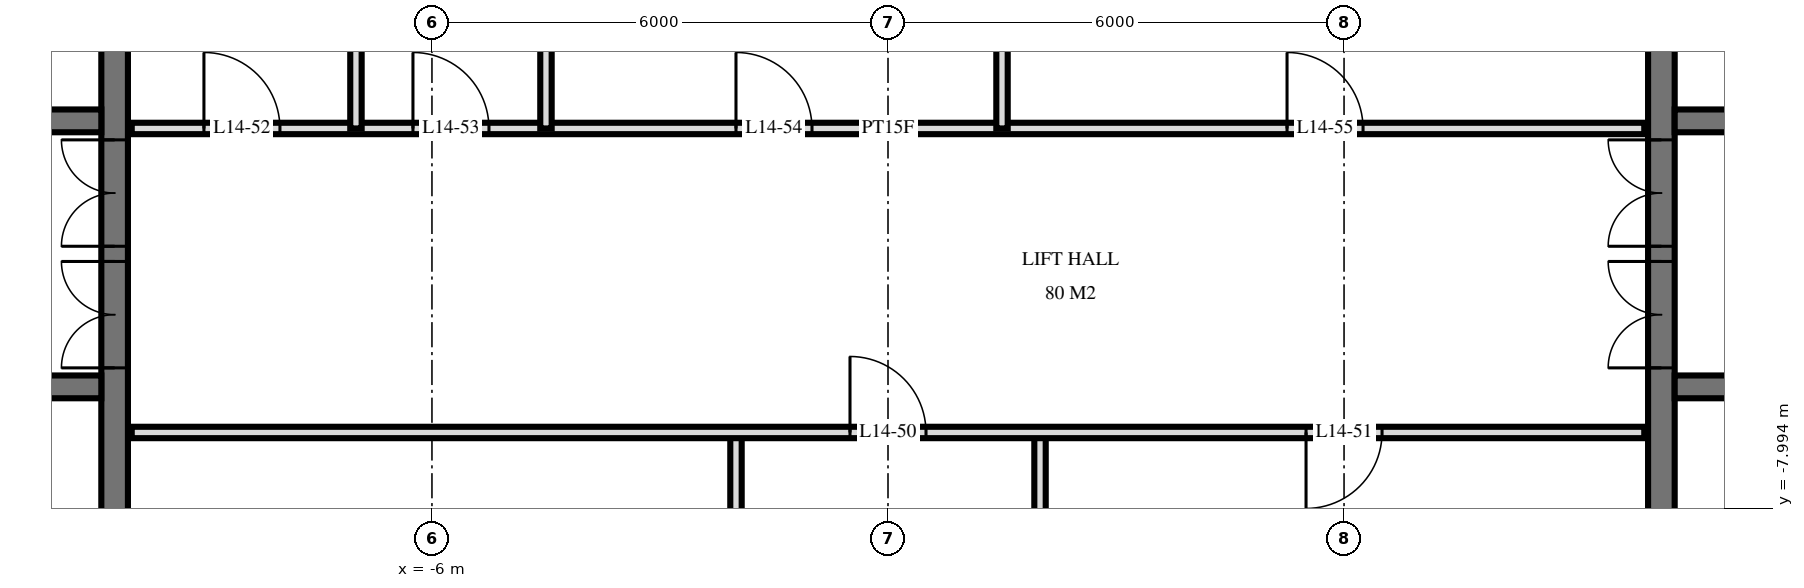
"""IFC4 building model, lengths in metres.
Left out: names, types, materials, properties, quantities, classifications, styles, units other than length and angle.
Written with IfcOpenShell. Run it as: python <this file> out.ifc"""

import sys

from ifc_helpers import new_model, si_unit, direction, frame, frame_2d, origin, place, context, subcontext, project, spatial, rectangle, extrude, element, fill, save


model = new_model("IFC4")
c1 = context("Model", 3, precision=1e-05, world=origin(), true_north=direction((0.0, 1.0)))
c2 = subcontext(c1, "Body", "Model", "MODEL_VIEW")
j1 = project(units=[si_unit("LENGTHUNIT", "METRE"), si_unit("PLANEANGLEUNIT", "RADIAN")], contexts=[c1])
p1 = place(None, origin())
s1 = spatial("IfcSite", under=j1, at=p1, CompositionType="ELEMENT")
p2 = place(p1, origin())
s2 = spatial("IfcBuilding", under=s1, at=p2, CompositionType="ELEMENT")
p3 = place(p2, frame((0.0, 0.0, 60.0)))
s3 = spatial("IfcBuildingStorey", under=s2, at=p3, CompositionType="ELEMENT", Elevation=60.0)
p4 = place(p3, frame((-10.175, -14.55, 0.0), z_axis=(0.0, 0.0, 1.0), x_axis=(0.0, 1.0, 0.0)))
e1 = element("IfcWall", 1, at=p4, inside=s3, PredefinedType="SHEAR", context=c2, shape_type="SweptSolid", body=[
    extrude(rectangle(XDim=14.1, YDim=0.35, at=frame_2d((7.05, 0.0))), origin(), (0.0, 0.0, 1.0), 3.6),
])
p5 = place(p4, frame((8.4, 0.0, 0.0)))
e2 = element("IfcOpeningElement", 2, at=p5, cuts=e1, PredefinedType="OPENING", context=c2, shape_type="SweptSolid", body=[
    extrude(rectangle(XDim=1.4, YDim=2.4, at=frame_2d((0.7, 1.2))), frame((0.0, 0.185, 0.0), z_axis=(0.0, -1.0, 0.0), x_axis=(1.0, 0.0, 0.0)), (0.0, 0.0, 1.0), 0.37),
])
p6 = place(p4, frame((10.0, 0.0, 0.0)))
e3 = element("IfcOpeningElement", 3, at=p6, cuts=e1, PredefinedType="OPENING", context=c2, shape_type="SweptSolid", body=[
    extrude(rectangle(XDim=1.4, YDim=2.4, at=frame_2d((0.7, 1.2))), frame((0.0, 0.185, 0.0), z_axis=(0.0, -1.0, 0.0), x_axis=(1.0, 0.0, 0.0)), (0.0, 0.0, 1.0), 0.37),
])
p7 = place(p4, frame((4.0, 0.0, 0.0)))
e4 = element("IfcOpeningElement", 4, at=p7, cuts=e1, PredefinedType="OPENING", context=c2, shape_type="SweptSolid", body=[
    extrude(rectangle(XDim=1.2, YDim=2.1, at=frame_2d((0.6, 1.05))), frame((0.0, 0.185, 0.0), z_axis=(0.0, -1.0, 0.0), x_axis=(1.0, 0.0, 0.0)), (0.0, 0.0, 1.0), 0.37),
])
p8 = place(p3, frame((-29.05, -2.9, 0.0), z_axis=(0.0, 0.0, 1.0), x_axis=(1.0, 0.0, 0.0)))
e5 = element("IfcWall", 5, at=p8, inside=s3, PredefinedType="SHEAR", context=c2, shape_type="SweptSolid", body=[
    extrude(rectangle(XDim=18.7, YDim=0.3, at=frame_2d((9.35, 0.0))), origin(), (0.0, 0.0, 1.0), 3.6),
])
p9 = place(p8, frame((2.95, 0.0, 0.0)))
e6 = element("IfcOpeningElement", 6, at=p9, cuts=e5, PredefinedType="OPENING", context=c2, shape_type="SweptSolid", body=[
    extrude(rectangle(XDim=1.1, YDim=2.1, at=frame_2d((0.55, 1.05))), frame((0.0, 0.16, 0.0), z_axis=(0.0, -1.0, 0.0), x_axis=(1.0, 0.0, 0.0)), (0.0, 0.0, 1.0), 0.32),
])
p10 = place(p8, frame((0.55, 0.0, 0.0)))
e7 = element("IfcOpeningElement", 7, at=p10, cuts=e5, PredefinedType="OPENING", context=c2, shape_type="SweptSolid", body=[
    extrude(rectangle(XDim=1.1, YDim=2.1, at=frame_2d((0.55, 1.05))), frame((0.0, 0.16, 0.0), z_axis=(0.0, -1.0, 0.0), x_axis=(1.0, 0.0, 0.0)), (0.0, 0.0, 1.0), 0.32),
])
p11 = place(p8, frame((10.9, 0.0, 0.0)))
e8 = element("IfcOpeningElement", 8, at=p11, cuts=e5, PredefinedType="OPENING", context=c2, shape_type="SweptSolid", body=[
    extrude(rectangle(XDim=0.9, YDim=2.1, at=frame_2d((0.45, 1.05))), frame((0.0, 0.16, 0.0), z_axis=(0.0, -1.0, 0.0), x_axis=(1.0, 0.0, 0.0)), (0.0, 0.0, 1.0), 0.32),
])
p12 = place(p8, frame((16.85, 0.0, 0.0)))
e9 = element("IfcOpeningElement", 9, at=p12, cuts=e5, PredefinedType="OPENING", context=c2, shape_type="SweptSolid", body=[
    extrude(rectangle(XDim=1.0, YDim=2.1, at=frame_2d((0.5, 1.05))), frame((0.0, 0.16, 0.0), z_axis=(0.0, -1.0, 0.0), x_axis=(1.0, 0.0, 0.0)), (0.0, 0.0, 1.0), 0.32),
])
p13 = place(p8, frame((13.85, 0.0, 0.0)))
e10 = element("IfcOpeningElement", 10, at=p13, cuts=e5, PredefinedType="OPENING", context=c2, shape_type="SweptSolid", body=[
    extrude(rectangle(XDim=1.0, YDim=2.1, at=frame_2d((0.5, 1.05))), frame((0.0, 0.16, 0.0), z_axis=(0.0, -1.0, 0.0), x_axis=(1.0, 0.0, 0.0)), (0.0, 0.0, 1.0), 0.32),
])
p14 = place(p8, frame((5.6, 0.0, 0.0)))
e11 = element("IfcOpeningElement", 11, at=p14, cuts=e5, PredefinedType="OPENING", context=c2, shape_type="SweptSolid", body=[
    extrude(rectangle(XDim=1.0, YDim=2.1, at=frame_2d((0.5, 1.05))), frame((0.0, 0.16, 0.0), z_axis=(0.0, -1.0, 0.0), x_axis=(1.0, 0.0, 0.0)), (0.0, 0.0, 1.0), 0.32),
])
p15 = place(p3, frame((-29.05, -6.4, 0.0), z_axis=(0.0, 0.0, 1.0), x_axis=(1.0, 0.0, 0.0)))
e12 = element("IfcWall", 12, at=p15, inside=s3, PredefinedType="SHEAR", context=c2, shape_type="SweptSolid", body=[
    extrude(rectangle(XDim=18.7, YDim=0.3, at=frame_2d((9.35, 0.0))), origin(), (0.0, 0.0, 1.0), 3.6),
])
p16 = place(p15, frame((2.95, 0.0, 0.0)))
e13 = element("IfcOpeningElement", 13, at=p16, cuts=e12, PredefinedType="OPENING", context=c2, shape_type="SweptSolid", body=[
    extrude(rectangle(XDim=1.1, YDim=2.1, at=frame_2d((0.55, 1.05))), frame((0.0, 0.16, 0.0), z_axis=(0.0, -1.0, 0.0), x_axis=(1.0, 0.0, 0.0)), (0.0, 0.0, 1.0), 0.32),
])
p17 = place(p15, frame((0.55, 0.0, 0.0)))
e14 = element("IfcOpeningElement", 14, at=p17, cuts=e12, PredefinedType="OPENING", context=c2, shape_type="SweptSolid", body=[
    extrude(rectangle(XDim=1.1, YDim=2.1, at=frame_2d((0.55, 1.05))), frame((0.0, 0.16, 0.0), z_axis=(0.0, -1.0, 0.0), x_axis=(1.0, 0.0, 0.0)), (0.0, 0.0, 1.0), 0.32),
])
p18 = place(p15, frame((10.8, 0.0, 0.0)))
e15 = element("IfcOpeningElement", 15, at=p18, cuts=e12, PredefinedType="OPENING", context=c2, shape_type="SweptSolid", body=[
    extrude(rectangle(XDim=1.1, YDim=2.1, at=frame_2d((0.55, 1.05))), frame((0.0, 0.16, 0.0), z_axis=(0.0, -1.0, 0.0), x_axis=(1.0, 0.0, 0.0)), (0.0, 0.0, 1.0), 0.32),
])
p19 = place(p15, frame((5.6, 0.0, 0.0)))
e16 = element("IfcOpeningElement", 16, at=p19, cuts=e12, PredefinedType="OPENING", context=c2, shape_type="SweptSolid", body=[
    extrude(rectangle(XDim=1.0, YDim=2.1, at=frame_2d((0.5, 1.05))), frame((0.0, 0.16, 0.0), z_axis=(0.0, -1.0, 0.0), x_axis=(1.0, 0.0, 0.0)), (0.0, 0.0, 1.0), 0.32),
])
p20 = place(p3, frame((10.175, -14.55, 0.0), z_axis=(0.0, 0.0, 1.0), x_axis=(0.0, 1.0, 0.0)))
e17 = element("IfcWall", 17, at=p20, inside=s3, PredefinedType="SHEAR", context=c2, shape_type="SweptSolid", body=[
    extrude(rectangle(XDim=14.1, YDim=0.35, at=frame_2d((7.05, 0.0))), origin(), (0.0, 0.0, 1.0), 3.6),
])
p21 = place(p20, frame((8.4, 0.0, 0.0)))
e18 = element("IfcOpeningElement", 18, at=p21, cuts=e17, PredefinedType="OPENING", context=c2, shape_type="SweptSolid", body=[
    extrude(rectangle(XDim=1.4, YDim=2.4, at=frame_2d((0.7, 1.2))), frame((0.0, 0.185, 0.0), z_axis=(0.0, -1.0, 0.0), x_axis=(1.0, 0.0, 0.0)), (0.0, 0.0, 1.0), 0.37),
])
p22 = place(p20, frame((10.0, 0.0, 0.0)))
e19 = element("IfcOpeningElement", 19, at=p22, cuts=e17, PredefinedType="OPENING", context=c2, shape_type="SweptSolid", body=[
    extrude(rectangle(XDim=1.4, YDim=2.4, at=frame_2d((0.7, 1.2))), frame((0.0, 0.185, 0.0), z_axis=(0.0, -1.0, 0.0), x_axis=(1.0, 0.0, 0.0)), (0.0, 0.0, 1.0), 0.37),
])
p23 = place(p20, frame((4.0, 0.0, 0.0)))
e20 = element("IfcOpeningElement", 20, at=p23, cuts=e17, PredefinedType="OPENING", context=c2, shape_type="SweptSolid", body=[
    extrude(rectangle(XDim=1.2, YDim=2.1, at=frame_2d((0.6, 1.05))), frame((0.0, 0.185, 0.0), z_axis=(0.0, -1.0, 0.0), x_axis=(1.0, 0.0, 0.0)), (0.0, 0.0, 1.0), 0.37),
])
p24 = place(p3, frame((10.35, -2.9, 0.0), z_axis=(0.0, 0.0, 1.0), x_axis=(1.0, 0.0, 0.0)))
e21 = element("IfcWall", 21, at=p24, inside=s3, PredefinedType="SHEAR", context=c2, shape_type="SweptSolid", body=[
    extrude(rectangle(XDim=18.7, YDim=0.3, at=frame_2d((9.35, 0.0))), origin(), (0.0, 0.0, 1.0), 3.6),
])
p25 = place(p24, frame((14.65, 0.0, 0.0)))
e22 = element("IfcOpeningElement", 22, at=p25, cuts=e21, PredefinedType="OPENING", context=c2, shape_type="SweptSolid", body=[
    extrude(rectangle(XDim=1.1, YDim=2.1, at=frame_2d((0.55, 1.05))), frame((0.0, 0.16, 0.0), z_axis=(0.0, -1.0, 0.0), x_axis=(1.0, 0.0, 0.0)), (0.0, 0.0, 1.0), 0.32),
])
p26 = place(p24, frame((17.05, 0.0, 0.0)))
e23 = element("IfcOpeningElement", 23, at=p26, cuts=e21, PredefinedType="OPENING", context=c2, shape_type="SweptSolid", body=[
    extrude(rectangle(XDim=1.1, YDim=2.1, at=frame_2d((0.55, 1.05))), frame((0.0, 0.16, 0.0), z_axis=(0.0, -1.0, 0.0), x_axis=(1.0, 0.0, 0.0)), (0.0, 0.0, 1.0), 0.32),
])
p27 = place(p24, frame((6.9, 0.0, 0.0)))
e24 = element("IfcOpeningElement", 24, at=p27, cuts=e21, PredefinedType="OPENING", context=c2, shape_type="SweptSolid", body=[
    extrude(rectangle(XDim=0.9, YDim=2.1, at=frame_2d((0.45, 1.05))), frame((0.0, 0.16, 0.0), z_axis=(0.0, -1.0, 0.0), x_axis=(1.0, 0.0, 0.0)), (0.0, 0.0, 1.0), 0.32),
])
p28 = place(p24, frame((0.85, 0.0, 0.0)))
e25 = element("IfcOpeningElement", 25, at=p28, cuts=e21, PredefinedType="OPENING", context=c2, shape_type="SweptSolid", body=[
    extrude(rectangle(XDim=1.0, YDim=2.1, at=frame_2d((0.5, 1.05))), frame((0.0, 0.16, 0.0), z_axis=(0.0, -1.0, 0.0), x_axis=(1.0, 0.0, 0.0)), (0.0, 0.0, 1.0), 0.32),
])
p29 = place(p24, frame((3.85, 0.0, 0.0)))
e26 = element("IfcOpeningElement", 26, at=p29, cuts=e21, PredefinedType="OPENING", context=c2, shape_type="SweptSolid", body=[
    extrude(rectangle(XDim=1.0, YDim=2.1, at=frame_2d((0.5, 1.05))), frame((0.0, 0.16, 0.0), z_axis=(0.0, -1.0, 0.0), x_axis=(1.0, 0.0, 0.0)), (0.0, 0.0, 1.0), 0.32),
])
p30 = place(p24, frame((12.1, 0.0, 0.0)))
e27 = element("IfcOpeningElement", 27, at=p30, cuts=e21, PredefinedType="OPENING", context=c2, shape_type="SweptSolid", body=[
    extrude(rectangle(XDim=1.0, YDim=2.1, at=frame_2d((0.5, 1.05))), frame((0.0, 0.16, 0.0), z_axis=(0.0, -1.0, 0.0), x_axis=(1.0, 0.0, 0.0)), (0.0, 0.0, 1.0), 0.32),
])
p31 = place(p3, frame((10.35, -6.4, 0.0), z_axis=(0.0, 0.0, 1.0), x_axis=(1.0, 0.0, 0.0)))
e28 = element("IfcWall", 28, at=p31, inside=s3, PredefinedType="SHEAR", context=c2, shape_type="SweptSolid", body=[
    extrude(rectangle(XDim=18.7, YDim=0.3, at=frame_2d((9.35, 0.0))), origin(), (0.0, 0.0, 1.0), 3.6),
])
p32 = place(p31, frame((14.65, 0.0, 0.0)))
e29 = element("IfcOpeningElement", 29, at=p32, cuts=e28, PredefinedType="OPENING", context=c2, shape_type="SweptSolid", body=[
    extrude(rectangle(XDim=1.1, YDim=2.1, at=frame_2d((0.55, 1.05))), frame((0.0, 0.16, 0.0), z_axis=(0.0, -1.0, 0.0), x_axis=(1.0, 0.0, 0.0)), (0.0, 0.0, 1.0), 0.32),
])
p33 = place(p31, frame((17.05, 0.0, 0.0)))
e30 = element("IfcOpeningElement", 30, at=p33, cuts=e28, PredefinedType="OPENING", context=c2, shape_type="SweptSolid", body=[
    extrude(rectangle(XDim=1.1, YDim=2.1, at=frame_2d((0.55, 1.05))), frame((0.0, 0.16, 0.0), z_axis=(0.0, -1.0, 0.0), x_axis=(1.0, 0.0, 0.0)), (0.0, 0.0, 1.0), 0.32),
])
p34 = place(p31, frame((6.8, 0.0, 0.0)))
e31 = element("IfcOpeningElement", 31, at=p34, cuts=e28, PredefinedType="OPENING", context=c2, shape_type="SweptSolid", body=[
    extrude(rectangle(XDim=1.1, YDim=2.1, at=frame_2d((0.55, 1.05))), frame((0.0, 0.16, 0.0), z_axis=(0.0, -1.0, 0.0), x_axis=(1.0, 0.0, 0.0)), (0.0, 0.0, 1.0), 0.32),
])
p35 = place(p31, frame((12.1, 0.0, 0.0)))
e32 = element("IfcOpeningElement", 32, at=p35, cuts=e28, PredefinedType="OPENING", context=c2, shape_type="SweptSolid", body=[
    extrude(rectangle(XDim=1.0, YDim=2.1, at=frame_2d((0.5, 1.05))), frame((0.0, 0.16, 0.0), z_axis=(0.0, -1.0, 0.0), x_axis=(1.0, 0.0, 0.0)), (0.0, 0.0, 1.0), 0.32),
])
p36 = place(p3, frame((2.0, -11.0, 0.0), z_axis=(0.0, 0.0, 1.0), x_axis=(0.0, 1.0, 0.0)))
e33 = element("IfcWall", 33, at=p36, inside=s3, PredefinedType="PARTITIONING", context=c2, shape_type="SweptSolid", body=[
    extrude(rectangle(XDim=4.0, YDim=0.15, at=frame_2d((2.0, 0.0))), origin(), (0.0, 0.0, 1.0), 3.32),
])
p37 = place(p3, frame((1.5, -3.0, 0.0), z_axis=(0.0, 0.0, 1.0), x_axis=(0.0, 1.0, 0.0)))
e34 = element("IfcWall", 34, at=p37, inside=s3, PredefinedType="PARTITIONING", context=c2, shape_type="SweptSolid", body=[
    extrude(rectangle(XDim=4.02, YDim=0.15, at=frame_2d((2.01, 0.0))), origin(), (0.0, 0.0, 1.0), 3.32),
])
p38 = place(p3, frame((-2.0, -11.0, 0.0), z_axis=(0.0, 0.0, 1.0), x_axis=(0.0, 1.0, 0.0)))
e35 = element("IfcWall", 35, at=p38, inside=s3, PredefinedType="PARTITIONING", context=c2, shape_type="SweptSolid", body=[
    extrude(rectangle(XDim=4.0, YDim=0.15, at=frame_2d((2.0, 0.0))), origin(), (0.0, 0.0, 1.0), 3.32),
])
for number, where, z_axis, x_axis in (
    (36, (-4.5, -3.0, 0.0), (0.0, 0.0, 1.0), (0.0, 1.0, 0.0)),
    (37, (-7.0, -3.0, 0.0), (0.0, 0.0, 1.0), (0.0, 1.0, 0.0)),
):
    element("IfcWall", number, at=place(p3, frame(where, z_axis=z_axis, x_axis=x_axis)), inside=s3, PredefinedType="PLUMBINGWALL", context=c2, shape_type="SweptSolid", body=[
        extrude(rectangle(XDim=4.02, YDim=0.15, at=frame_2d((2.01, 0.0))), origin(), (0.0, 0.0, 1.0), 3.32),
    ])
p39 = place(p3, frame((-9.95, -7.0, 0.0), z_axis=(0.0, 0.0, 1.0), x_axis=(1.0, 0.0, 0.0)))
e38 = element("IfcWall", 38, at=p39, inside=s3, PredefinedType="PARTITIONING", context=c2, shape_type="SweptSolid", body=[
    extrude(rectangle(XDim=19.9, YDim=0.15, at=frame_2d((9.95, 0.0))), origin(), (0.0, 0.0, 1.0), 3.32),
])
p40 = place(p39, frame((9.45, 0.0, 0.0)))
e39 = element("IfcOpeningElement", 39, at=p40, cuts=e38, PredefinedType="OPENING", context=c2, shape_type="SweptSolid", body=[
    extrude(rectangle(XDim=1.0, YDim=2.1, at=frame_2d((0.5, 1.05))), frame((0.0, 0.085, 0.0), z_axis=(0.0, -1.0, 0.0), x_axis=(1.0, 0.0, 0.0)), (0.0, 0.0, 1.0), 0.17),
])
p41 = place(p39, frame((15.45, 0.0, 0.0)))
e40 = element("IfcOpeningElement", 40, at=p41, cuts=e38, PredefinedType="OPENING", context=c2, shape_type="SweptSolid", body=[
    extrude(rectangle(XDim=1.0, YDim=2.1, at=frame_2d((0.5, 1.05))), frame((0.0, 0.085, 0.0), z_axis=(0.0, -1.0, 0.0), x_axis=(1.0, 0.0, 0.0)), (0.0, 0.0, 1.0), 0.17),
])
p42 = place(p3, frame((-9.95, -3.0, 0.0), z_axis=(0.0, 0.0, 1.0), x_axis=(1.0, 0.0, 0.0)))
e41 = element("IfcWall", 41, at=p42, inside=s3, PredefinedType="PARTITIONING", context=c2, shape_type="SweptSolid", body=[
    extrude(rectangle(XDim=19.9, YDim=0.15, at=frame_2d((9.95, 0.0))), origin(), (0.0, 0.0, 1.0), 3.32),
])
p43 = place(p42, frame((0.95, 0.0, 0.0)))
e42 = element("IfcOpeningElement", 42, at=p43, cuts=e41, PredefinedType="OPENING", context=c2, shape_type="SweptSolid", body=[
    extrude(rectangle(XDim=1.0, YDim=2.1, at=frame_2d((0.5, 1.05))), frame((0.0, 0.085, 0.0), z_axis=(0.0, -1.0, 0.0), x_axis=(1.0, 0.0, 0.0)), (0.0, 0.0, 1.0), 0.17),
])
p44 = place(p42, frame((3.7, 0.0, 0.0)))
e43 = element("IfcOpeningElement", 43, at=p44, cuts=e41, PredefinedType="OPENING", context=c2, shape_type="SweptSolid", body=[
    extrude(rectangle(XDim=1.0, YDim=2.1, at=frame_2d((0.5, 1.05))), frame((0.0, 0.085, 0.0), z_axis=(0.0, -1.0, 0.0), x_axis=(1.0, 0.0, 0.0)), (0.0, 0.0, 1.0), 0.17),
])
p45 = place(p42, frame((7.95, 0.0, 0.0)))
e44 = element("IfcOpeningElement", 44, at=p45, cuts=e41, PredefinedType="OPENING", context=c2, shape_type="SweptSolid", body=[
    extrude(rectangle(XDim=1.0, YDim=2.1, at=frame_2d((0.5, 1.05))), frame((0.0, 0.085, 0.0), z_axis=(0.0, -1.0, 0.0), x_axis=(1.0, 0.0, 0.0)), (0.0, 0.0, 1.0), 0.17),
])
p46 = place(p42, frame((15.2, 0.0, 0.0)))
e45 = element("IfcOpeningElement", 45, at=p46, cuts=e41, PredefinedType="OPENING", context=c2, shape_type="SweptSolid", body=[
    extrude(rectangle(XDim=1.0, YDim=2.1, at=frame_2d((0.5, 1.05))), frame((0.0, 0.085, 0.0), z_axis=(0.0, -1.0, 0.0), x_axis=(1.0, 0.0, 0.0)), (0.0, 0.0, 1.0), 0.17),
])
p47 = place(p5, origin())
e46 = element("IfcDoor", 46, at=p47, inside=s3, OperationType="DOUBLE_DOOR_SINGLE_SWING", PredefinedType="DOOR", context=c2, shape_type="SweptSolid", body=[
    extrude(rectangle(XDim=1.4, YDim=2.4, at=frame_2d((0.7, 1.2))), frame((0.0, 0.025, 0.0), z_axis=(0.0, -1.0, 0.0), x_axis=(1.0, 0.0, 0.0)), (0.0, 0.0, 1.0), 0.05),
])
fill(e2, e46)
p48 = place(p6, origin())
e47 = element("IfcDoor", 47, at=p48, inside=s3, OperationType="DOUBLE_DOOR_SINGLE_SWING", PredefinedType="DOOR", context=c2, shape_type="SweptSolid", body=[
    extrude(rectangle(XDim=1.4, YDim=2.4, at=frame_2d((0.7, 1.2))), frame((0.0, 0.025, 0.0), z_axis=(0.0, -1.0, 0.0), x_axis=(1.0, 0.0, 0.0)), (0.0, 0.0, 1.0), 0.05),
])
fill(e3, e47)
p49 = place(p21, origin())
e48 = element("IfcDoor", 48, at=p49, inside=s3, OperationType="DOUBLE_DOOR_SINGLE_SWING", PredefinedType="DOOR", context=c2, shape_type="SweptSolid", body=[
    extrude(rectangle(XDim=1.4, YDim=2.4, at=frame_2d((0.7, 1.2))), frame((0.0, 0.025, 0.0), z_axis=(0.0, -1.0, 0.0), x_axis=(1.0, 0.0, 0.0)), (0.0, 0.0, 1.0), 0.05),
])
fill(e18, e48)
p50 = place(p22, origin())
e49 = element("IfcDoor", 49, at=p50, inside=s3, OperationType="DOUBLE_DOOR_SINGLE_SWING", PredefinedType="DOOR", context=c2, shape_type="SweptSolid", body=[
    extrude(rectangle(XDim=1.4, YDim=2.4, at=frame_2d((0.7, 1.2))), frame((0.0, 0.025, 0.0), z_axis=(0.0, -1.0, 0.0), x_axis=(1.0, 0.0, 0.0)), (0.0, 0.0, 1.0), 0.05),
])
fill(e19, e49)
p51 = place(p40, origin())
e50 = element("IfcDoor", 50, at=p51, inside=s3, OperationType="SINGLE_SWING_RIGHT", PredefinedType="DOOR", context=c2, shape_type="SweptSolid", body=[
    extrude(rectangle(XDim=1.0, YDim=2.1, at=frame_2d((0.5, 1.05))), frame((0.0, 0.025, 0.0), z_axis=(0.0, -1.0, 0.0), x_axis=(1.0, 0.0, 0.0)), (0.0, 0.0, 1.0), 0.05),
])
fill(e39, e50)
p52 = place(p41, frame((0.5, 0.0, 0.0), z_axis=(0.0, 0.0, 1.0), x_axis=(-1.0, 0.0, 0.0)))
e51 = element("IfcDoor", 51, at=p52, inside=s3, OperationType="SINGLE_SWING_LEFT", PredefinedType="DOOR", context=c2, shape_type="SweptSolid", body=[
    extrude(rectangle(XDim=1.0, YDim=2.1, at=frame_2d((0.0, 1.05))), frame((0.0, -0.025, 0.0), z_axis=(0.0, 1.0, 0.0), x_axis=(-1.0, 0.0, 0.0)), (0.0, 0.0, 1.0), 0.05),
])
fill(e40, e51)
p53 = place(p43, origin())
e52 = element("IfcDoor", 52, at=p53, inside=s3, OperationType="SINGLE_SWING_RIGHT", PredefinedType="DOOR", context=c2, shape_type="SweptSolid", body=[
    extrude(rectangle(XDim=1.0, YDim=2.1, at=frame_2d((0.5, 1.05))), frame((0.0, 0.025, 0.0), z_axis=(0.0, -1.0, 0.0), x_axis=(1.0, 0.0, 0.0)), (0.0, 0.0, 1.0), 0.05),
])
fill(e42, e52)
p54 = place(p44, origin())
e53 = element("IfcDoor", 53, at=p54, inside=s3, OperationType="SINGLE_SWING_RIGHT", PredefinedType="DOOR", context=c2, shape_type="SweptSolid", body=[
    extrude(rectangle(XDim=1.0, YDim=2.1, at=frame_2d((0.5, 1.05))), frame((0.0, 0.025, 0.0), z_axis=(0.0, -1.0, 0.0), x_axis=(1.0, 0.0, 0.0)), (0.0, 0.0, 1.0), 0.05),
])
fill(e43, e53)
p55 = place(p45, origin())
e54 = element("IfcDoor", 54, at=p55, inside=s3, OperationType="SINGLE_SWING_RIGHT", PredefinedType="DOOR", context=c2, shape_type="SweptSolid", body=[
    extrude(rectangle(XDim=1.0, YDim=2.1, at=frame_2d((0.5, 1.05))), frame((0.0, 0.025, 0.0), z_axis=(0.0, -1.0, 0.0), x_axis=(1.0, 0.0, 0.0)), (0.0, 0.0, 1.0), 0.05),
])
fill(e44, e54)
p56 = place(p46, origin())
e55 = element("IfcDoor", 55, at=p56, inside=s3, OperationType="SINGLE_SWING_RIGHT", PredefinedType="DOOR", context=c2, shape_type="SweptSolid", body=[
    extrude(rectangle(XDim=1.0, YDim=2.1, at=frame_2d((0.5, 1.05))), frame((0.0, 0.025, 0.0), z_axis=(0.0, -1.0, 0.0), x_axis=(1.0, 0.0, 0.0)), (0.0, 0.0, 1.0), 0.05),
])
fill(e45, e55)
save(model, sys.argv[1])
